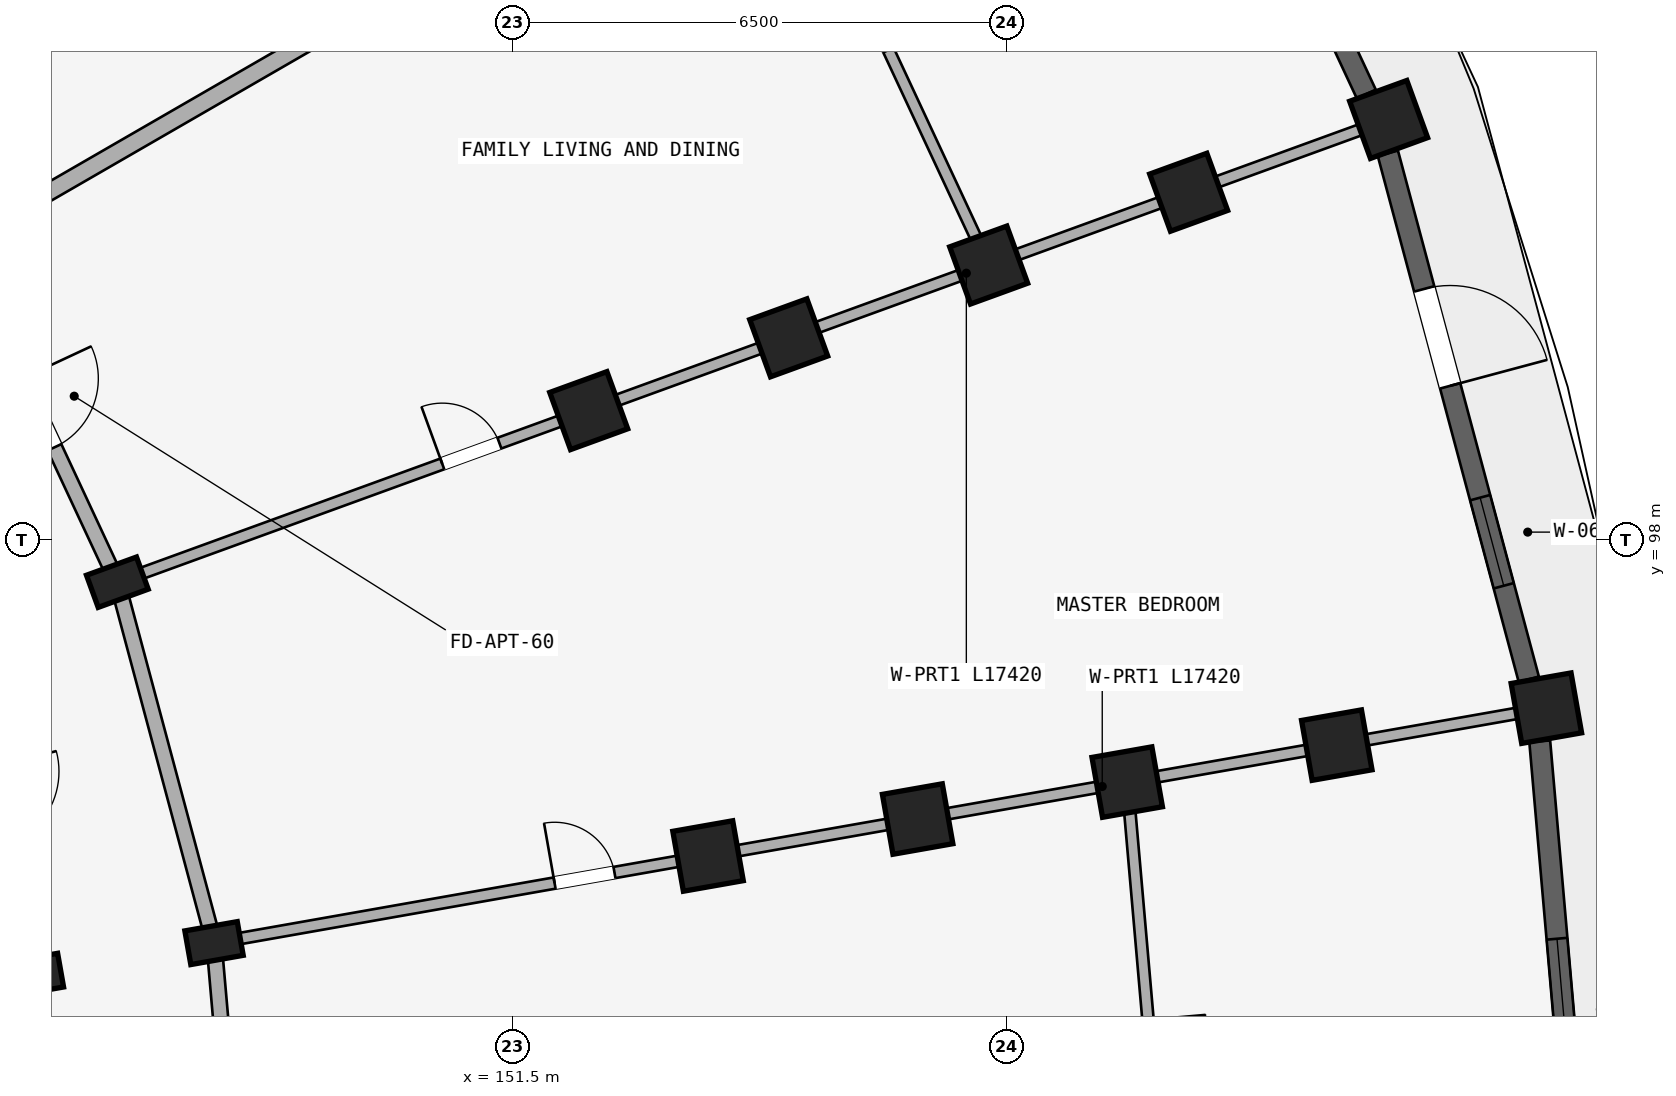
"""IFC4 building model, lengths in metres.
Left out: names, types, materials, properties, quantities, classifications, styles, units other than length and angle.
Written with IfcOpenShell. Run it as: python <this file> out.ifc"""

import sys

from ifc_helpers import new_model, si_unit, direction, frame, frame_2d, origin, origin_2d, place, context, subcontext, project, spatial, rectangle, extrude, element, fill, save


model = new_model("IFC4")
c1 = context("Model", 3, precision=1e-05, world=origin(), true_north=direction((0.0, 1.0)))
c2 = subcontext(c1, "Body", "Model", "MODEL_VIEW")
j1 = project(units=[si_unit("LENGTHUNIT", "METRE"), si_unit("PLANEANGLEUNIT", "RADIAN")], contexts=[c1])
p1 = place(None, origin())
s1 = spatial("IfcSite", under=j1, at=p1, CompositionType="ELEMENT")
p2 = place(p1, origin())
s2 = spatial("IfcBuilding", under=s1, at=p2, CompositionType="ELEMENT")
p3 = place(p2, frame((0.0, 0.0, 11.85)))
s3 = spatial("IfcBuildingStorey", under=s2, at=p3, CompositionType="ELEMENT", Elevation=11.85)
p4 = place(p3, frame((146.299, 97.445, 0.0), z_axis=(0.0, 0.0, 1.0), x_axis=(-0.342020143326, 0.939692620786, 0.0)))
e1 = element("IfcColumn", 1, at=p4, inside=s3, PredefinedType="COLUMN", context=c2, shape_type="SweptSolid", body=[
    extrude(rectangle(XDim=0.45, YDim=0.7, at=origin_2d()), origin(), (0.0, 0.0, 1.0), 2.93),
])
for number, where, z_axis, x_axis in (
    (2, (152.501, 99.702, 0.0), (0.0, 0.0, 1.0), (-0.342, 0.94, 0.0)),
    (3, (155.132, 100.66, 0.0), (0.0, 0.0, 1.0), (-0.342, 0.94, 0.0)),
    (4, (157.764, 101.618, 0.0), (0.0, 0.0, 1.0), (-0.342, 0.94, 0.0)),
    (5, (160.395, 102.575, 0.0), (0.0, 0.0, 1.0), (-0.342, 0.94, 0.0)),
    (6, (163.026, 103.533, 0.0), (0.0, 0.0, 1.0), (-0.342, 0.94, 0.0)),
):
    element("IfcColumn", number, at=place(p3, frame(where, z_axis=z_axis, x_axis=x_axis)), inside=s3, PredefinedType="COLUMN", context=c2, shape_type="SweptSolid", body=[
        extrude(rectangle(XDim=0.8, YDim=0.8, at=origin_2d()), origin(), (0.0, 0.0, 1.0), 2.93),
    ])
for number, where, z_axis, x_axis in (
    (7, (145.208, 92.28, 0.0), (0.0, 0.0, 1.0), (-0.174, 0.985, 0.0)),
    (8, (147.572, 92.697, 0.0), (0.0, 0.0, 1.0), (-0.174, 0.985, 0.0)),
):
    element("IfcColumn", number, at=place(p3, frame(where, z_axis=z_axis, x_axis=x_axis)), inside=s3, PredefinedType="COLUMN", context=c2, shape_type="SweptSolid", body=[
        extrude(rectangle(XDim=0.45, YDim=0.7, at=origin_2d()), origin(), (0.0, 0.0, 1.0), 2.93),
    ])
for number, where, z_axis, x_axis in (
    (9, (154.071, 93.843, 0.0), (0.0, 0.0, 1.0), (-0.174, 0.985, 0.0)),
    (10, (156.829, 94.329, 0.0), (0.0, 0.0, 1.0), (-0.174, 0.985, 0.0)),
    (11, (159.586, 94.815, 0.0), (0.0, 0.0, 1.0), (-0.174, 0.985, 0.0)),
    (12, (162.344, 95.302, 0.0), (0.0, 0.0, 1.0), (-0.174, 0.985, 0.0)),
    (13, (165.101, 95.788, 0.0), (0.0, 0.0, 1.0), (-0.174, 0.985, 0.0)),
):
    element("IfcColumn", number, at=place(p3, frame(where, z_axis=z_axis, x_axis=x_axis)), inside=s3, PredefinedType="COLUMN", context=c2, shape_type="SweptSolid", body=[
        extrude(rectangle(XDim=0.8, YDim=0.8, at=origin_2d()), origin(), (0.0, 0.0, 1.0), 2.93),
    ])
p5 = place(p3, frame((144.222, 101.9, 0.0), z_axis=(0.0, 0.0, 1.0), x_axis=(0.422629854778, -0.906302381024, 0.0)))
e14 = element("IfcWall", 14, at=p5, inside=s3, PredefinedType="STANDARD", context=c2, shape_type="SweptSolid", body=[
    extrude(rectangle(XDim=4.915, YDim=0.2, at=frame_2d((2.458, 0.0))), origin(), (0.0, 0.0, 1.0), 2.372),
])
p6 = place(p5, frame((1.958, 0.0, 0.0)))
e15 = element("IfcOpeningElement", 15, at=p6, cuts=e14, PredefinedType="OPENING", context=c2, shape_type="SweptSolid", body=[
    extrude(rectangle(XDim=1.0, YDim=2.15, at=frame_2d((0.5, 1.075))), frame((0.0, 0.11, 0.0), z_axis=(0.0, -1.0, 0.0), x_axis=(1.0, 0.0, 0.0)), (0.0, 0.0, 1.0), 0.22),
])
p7 = place(p3, frame((146.299, 97.445, 0.0), z_axis=(0.0, 0.0, 1.0), x_axis=(0.258803112091, -0.965930095386, 0.0)))
e16 = element("IfcWall", 16, at=p7, inside=s3, PredefinedType="STANDARD", context=c2, shape_type="SweptSolid", body=[
    extrude(rectangle(XDim=4.916, YDim=0.2, at=frame_2d((2.458, 0.0))), origin(), (0.0, 0.0, 1.0), 2.372),
])
p8 = place(p3, frame((145.208, 92.28, 0.0), z_axis=(0.0, 0.0, 1.0), x_axis=(0.087187153726, -0.996191949488, 0.0)))
e17 = element("IfcWall", 17, at=p8, inside=s3, PredefinedType="STANDARD", context=c2, shape_type="SweptSolid", body=[
    extrude(rectangle(XDim=4.497, YDim=0.2, at=frame_2d((2.249, 0.0))), origin(), (0.0, 0.0, 1.0), 2.372),
])
p9 = place(p3, frame((147.572, 92.697, 0.0), z_axis=(0.0, 0.0, 1.0), x_axis=(0.087167566415, -0.996193663584, 0.0)))
e18 = element("IfcWall", 18, at=p9, inside=s3, PredefinedType="STANDARD", context=c2, shape_type="SweptSolid", body=[
    extrude(rectangle(XDim=4.916, YDim=0.2, at=frame_2d((2.458, 0.0))), origin(), (0.0, 0.0, 1.0), 2.372),
])
p10 = place(p3, frame((144.309, 101.95, 0.0), z_axis=(0.0, 0.0, 1.0), x_axis=(0.866026648973, 0.499997843263, 0.0)))
e19 = element("IfcWall", 19, at=p10, inside=s3, PredefinedType="STANDARD", context=c2, shape_type="SweptSolid", body=[
    extrude(rectangle(XDim=17.42, YDim=0.23, at=frame_2d((8.71, 0.0))), origin(), (0.0, 0.0, 1.0), 2.372),
])
p11 = place(p3, frame((146.393, 97.479, 0.0), z_axis=(0.0, 0.0, 1.0), x_axis=(0.939691901159, 0.342022120477, 0.0)))
e20 = element("IfcWall", 20, at=p11, inside=s3, PredefinedType="PARTITIONING", context=c2, shape_type="SweptSolid", body=[
    extrude(rectangle(XDim=17.42, YDim=0.15, at=frame_2d((8.71, 0.0))), origin(), (0.0, 0.0, 1.0), 2.372),
])
p12 = place(p11, frame((4.45, 0.0, 0.0)))
e21 = element("IfcOpeningElement", 21, at=p12, cuts=e20, PredefinedType="OPENING", context=c2, shape_type="SweptSolid", body=[
    extrude(rectangle(XDim=0.8, YDim=2.1, at=frame_2d((0.4, 1.05))), frame((0.0, 0.085, 0.0), z_axis=(0.0, -1.0, 0.0), x_axis=(1.0, 0.0, 0.0)), (0.0, 0.0, 1.0), 0.17),
])
p13 = place(p3, frame((147.67, 92.714, 0.0), z_axis=(0.0, 0.0, 1.0), x_axis=(0.984808098809, 0.173646216546, 0.0)))
e22 = element("IfcWall", 22, at=p13, inside=s3, PredefinedType="PARTITIONING", context=c2, shape_type="SweptSolid", body=[
    extrude(rectangle(XDim=17.42, YDim=0.15, at=frame_2d((8.71, 0.0))), origin(), (0.0, 0.0, 1.0), 2.372),
])
p14 = place(p13, frame((4.45, 0.0, 0.0)))
e23 = element("IfcOpeningElement", 23, at=p14, cuts=e22, PredefinedType="OPENING", context=c2, shape_type="SweptSolid", body=[
    extrude(rectangle(XDim=0.8, YDim=2.1, at=frame_2d((0.4, 1.05))), frame((0.0, 0.085, 0.0), z_axis=(0.0, -1.0, 0.0), x_axis=(1.0, 0.0, 0.0)), (0.0, 0.0, 1.0), 0.17),
])
p15 = place(p3, frame((154.787, 108.0, 0.0), z_axis=(0.0, 0.0, 1.0), x_axis=(0.422640621205, -0.906297360311, 0.0)))
e24 = element("IfcWall", 24, at=p15, inside=s3, PredefinedType="PLUMBINGWALL", context=c2, shape_type="SweptSolid", body=[
    extrude(rectangle(XDim=7.042, YDim=0.15, at=frame_2d((3.521, 0.0))), origin(), (0.0, 0.0, 1.0), 2.372),
])
p16 = place(p15, frame((3.121, 0.0, 0.0)))
e25 = element("IfcOpeningElement", 25, at=p16, cuts=e24, PredefinedType="OPENING", context=c2, shape_type="SweptSolid", body=[
    extrude(rectangle(XDim=0.8, YDim=2.1, at=frame_2d((0.4, 1.05))), frame((0.0, 0.085, 0.0), z_axis=(0.0, -1.0, 0.0), x_axis=(1.0, 0.0, 0.0)), (0.0, 0.0, 1.0), 0.17),
])
p17 = place(p3, frame((159.586, 94.815, 0.0), z_axis=(0.0, 0.0, 1.0), x_axis=(0.087156198737, -0.996194658198, 0.0)))
e26 = element("IfcWall", 26, at=p17, inside=s3, PredefinedType="PLUMBINGWALL", context=c2, shape_type="SweptSolid", body=[
    extrude(rectangle(XDim=7.042, YDim=0.15, at=frame_2d((3.521, 0.0))), origin(), (0.0, 0.0, 1.0), 2.372),
])
p18 = place(p17, frame((3.141, 0.0, 0.0)))
e27 = element("IfcOpeningElement", 27, at=p18, cuts=e26, PredefinedType="OPENING", context=c2, shape_type="SweptSolid", body=[
    extrude(rectangle(XDim=0.76, YDim=2.05, at=frame_2d((0.38, 1.025))), frame((0.0, 0.085, 0.0), z_axis=(0.0, -1.0, 0.0), x_axis=(1.0, 0.0, 0.0)), (0.0, 0.0, 1.0), 0.17),
])
p19 = place(p3, frame((159.704, 110.36, 0.0), z_axis=(0.0, 0.0, 1.0), x_axis=(0.422633596215, -0.906300636296, 0.0)))
e28 = element("IfcWall", 28, at=p19, inside=s3, PredefinedType="STANDARD", context=c2, shape_type="SweptSolid", body=[
    extrude(rectangle(XDim=7.164, YDim=0.275, at=frame_2d((3.582, 0.0))), origin(), (0.0, 0.0, 1.0), 2.372),
])
p20 = place(p19, frame((2.682, 0.0, 0.522)))
e29 = element("IfcOpeningElement", 29, at=p20, cuts=e28, PredefinedType="OPENING", context=c2, shape_type="SweptSolid", body=[
    extrude(rectangle(XDim=1.8, YDim=1.65, at=frame_2d((0.9, 0.825))), frame((0.0, 0.147, 0.0), z_axis=(0.0, -1.0, 0.0), x_axis=(1.0, 0.0, 0.0)), (0.0, 0.0, 1.0), 0.295),
])
p21 = place(p3, frame((163.016, 103.088, 0.0), z_axis=(0.0, 0.0, 1.0), x_axis=(0.258826933296, -0.965923712619, 0.0)))
e30 = element("IfcWall", 30, at=p21, inside=s3, PredefinedType="STANDARD", context=c2, shape_type="SweptSolid", body=[
    extrude(rectangle(XDim=7.164, YDim=0.275, at=frame_2d((3.582, 0.0))), origin(), (0.0, 0.0, 1.0), 2.372),
])
p22 = place(p21, frame((4.69, 0.0, 0.372)))
e31 = element("IfcOpeningElement", 31, at=p22, cuts=e30, PredefinedType="OPENING", context=c2, shape_type="SweptSolid", body=[
    extrude(rectangle(XDim=1.2, YDim=1.5, at=frame_2d((0.6, 0.75))), frame((0.0, 0.147, 0.0), z_axis=(0.0, -1.0, 0.0), x_axis=(1.0, 0.0, 0.0)), (0.0, 0.0, 1.0), 0.295),
])
p23 = place(p21, frame((1.847, 0.0, 0.0)))
e32 = element("IfcOpeningElement", 32, at=p23, cuts=e30, PredefinedType="OPENING", context=c2, shape_type="SweptSolid", body=[
    extrude(rectangle(XDim=1.32, YDim=2.15, at=frame_2d((0.66, 1.075))), frame((0.0, 0.147, 0.0), z_axis=(0.0, -1.0, 0.0), x_axis=(1.0, 0.0, 0.0)), (0.0, 0.0, 1.0), 0.295),
])
p24 = place(p3, frame((165.014, 95.351, 0.0), z_axis=(0.0, 0.0, 1.0), x_axis=(0.08713989423, -0.99619608453, 0.0)))
e33 = element("IfcWall", 33, at=p24, inside=s3, PredefinedType="STANDARD", context=c2, shape_type="SweptSolid", body=[
    extrude(rectangle(XDim=7.164, YDim=0.275, at=frame_2d((3.582, 0.0))), origin(), (0.0, 0.0, 1.0), 2.372),
])
p25 = place(p24, frame((2.607, 0.0, 0.322)))
e34 = element("IfcOpeningElement", 34, at=p25, cuts=e33, PredefinedType="OPENING", context=c2, shape_type="SweptSolid", body=[
    extrude(rectangle(XDim=1.95, YDim=1.85, at=frame_2d((0.975, 0.925))), frame((0.0, 0.147, 0.0), z_axis=(0.0, -1.0, 0.0), x_axis=(1.0, 0.0, 0.0)), (0.0, 0.0, 1.0), 0.295),
])
p26 = place(p22, origin())
e35 = element("IfcWindow", 35, at=p26, inside=s3, PartitioningType="SINGLE_PANEL", PredefinedType="WINDOW", context=c2, shape_type="SweptSolid", body=[
    extrude(rectangle(XDim=1.2, YDim=1.5, at=frame_2d((0.6, 0.75))), frame((0.0, 0.03, 0.0), z_axis=(0.0, -1.0, 0.0), x_axis=(1.0, 0.0, 0.0)), (0.0, 0.0, 1.0), 0.06),
])
fill(e31, e35)
p27 = place(p25, origin())
e36 = element("IfcWindow", 36, at=p27, inside=s3, PartitioningType="DOUBLE_PANEL_VERTICAL", PredefinedType="WINDOW", context=c2, shape_type="SweptSolid", body=[
    extrude(rectangle(XDim=1.95, YDim=1.85, at=frame_2d((0.975, 0.925))), frame((0.0, 0.03, 0.0), z_axis=(0.0, -1.0, 0.0), x_axis=(1.0, 0.0, 0.0)), (0.0, 0.0, 1.0), 0.06),
])
fill(e34, e36)
p28 = place(p12, origin())
e37 = element("IfcDoor", 37, at=p28, inside=s3, OperationType="SINGLE_SWING_LEFT", PredefinedType="DOOR", context=c2, shape_type="SweptSolid", body=[
    extrude(rectangle(XDim=0.8, YDim=2.1, at=frame_2d((0.4, 1.05))), frame((0.0, 0.025, 0.0), z_axis=(0.0, -1.0, 0.0), x_axis=(1.0, 0.0, 0.0)), (0.0, 0.0, 1.0), 0.05),
])
fill(e21, e37)
p29 = place(p14, origin())
e38 = element("IfcDoor", 38, at=p29, inside=s3, OperationType="SINGLE_SWING_LEFT", PredefinedType="DOOR", context=c2, shape_type="SweptSolid", body=[
    extrude(rectangle(XDim=0.8, YDim=2.1, at=frame_2d((0.4, 1.05))), frame((0.0, 0.025, 0.0), z_axis=(0.0, -1.0, 0.0), x_axis=(1.0, 0.0, 0.0)), (0.0, 0.0, 1.0), 0.05),
])
fill(e23, e38)
p30 = place(p6, frame((1.0, 0.0, 0.0), z_axis=(0.0, 0.0, 1.0), x_axis=(-1.0, 0.0, 0.0)))
e39 = element("IfcDoor", 39, at=p30, inside=s3, OperationType="SINGLE_SWING_RIGHT", PredefinedType="DOOR", context=c2, shape_type="SweptSolid", body=[
    extrude(rectangle(XDim=1.0, YDim=2.15, at=frame_2d((0.5, 1.075))), frame((0.0, 0.025, 0.0), z_axis=(0.0, -1.0, 0.0), x_axis=(1.0, 0.0, 0.0)), (0.0, 0.0, 1.0), 0.05),
])
fill(e15, e39)
p31 = place(p23, origin())
e40 = element("IfcDoor", 40, at=p31, inside=s3, OperationType="SINGLE_SWING_RIGHT", PredefinedType="DOOR", context=c2, shape_type="SweptSolid", body=[
    extrude(rectangle(XDim=1.32, YDim=2.15, at=frame_2d((0.66, 1.075))), frame((0.0, 0.025, 0.0), z_axis=(0.0, -1.0, 0.0), x_axis=(1.0, 0.0, 0.0)), (0.0, 0.0, 1.0), 0.05),
])
fill(e32, e40)
save(model, sys.argv[1])
